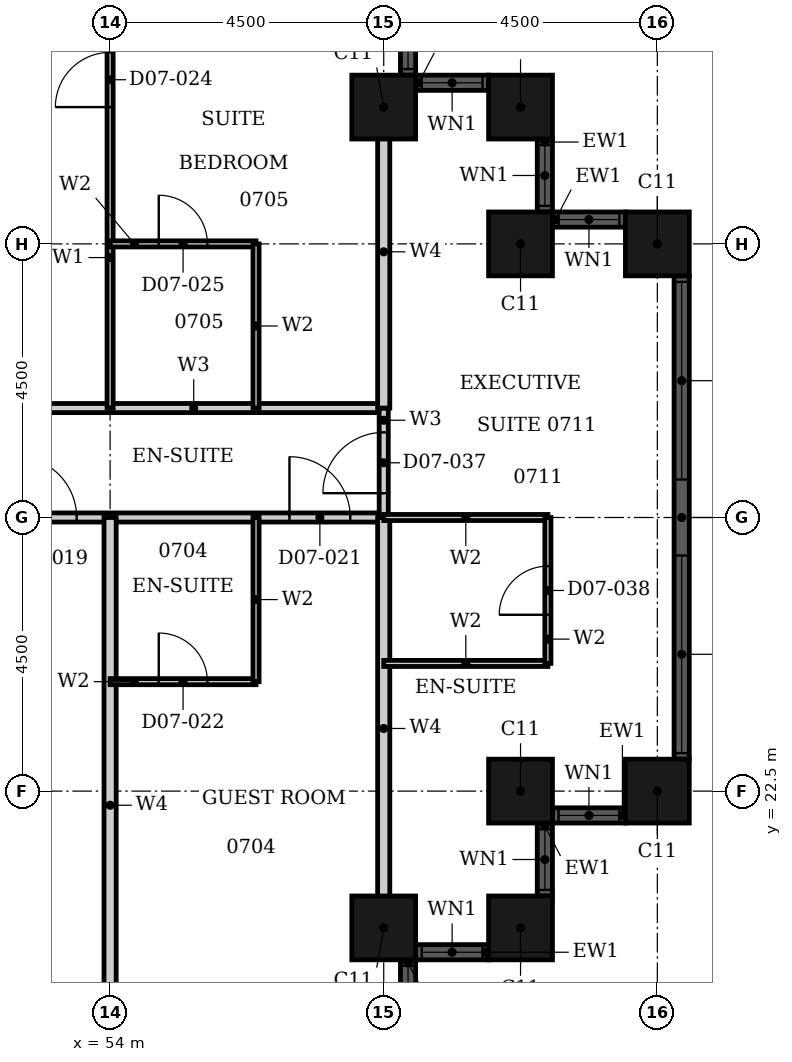
"""IFC4 building model, lengths in metres.
Left out: names, types, materials, properties, quantities, classifications, styles, units other than length and angle.
Written with IfcOpenShell. Run it as: python <this file> out.ifc"""

import sys

from ifc_helpers import new_model, si_unit, direction, frame, frame_2d, origin, origin_2d, place, context, subcontext, project, spatial, rectangle, hollow_rectangle, extrude, element, fill, save


model = new_model("IFC4")
c1 = context("Model", 3, precision=1e-05, world=origin(), true_north=direction((0.0, 1.0)))
c2 = subcontext(c1, "Body", "Model", "MODEL_VIEW")
j1 = project(units=[si_unit("LENGTHUNIT", "METRE"), si_unit("PLANEANGLEUNIT", "RADIAN")], contexts=[c1])
p1 = place(None, origin())
s1 = spatial("IfcSite", under=j1, at=p1, CompositionType="ELEMENT")
p2 = place(p1, origin())
s2 = spatial("IfcBuilding", under=s1, at=p2, CompositionType="ELEMENT")
p3 = place(p2, frame((0.0, 0.0, 37.2)))
s3 = spatial("IfcBuildingStorey", under=s2, at=p3, CompositionType="ELEMENT", Elevation=37.2)
for number, where, z_axis, x_axis in (
    (1, (58.5, 20.25, 0.0), (0.0, 0.0, 1.0), (1.0, 0.0, 0.0)),
    (2, (60.75, 20.25, 0.0), (0.0, 0.0, 1.0), (1.0, 0.0, 0.0)),
    (3, (60.75, 22.5, 0.0), (0.0, 0.0, 1.0), (1.0, 0.0, 0.0)),
    (4, (63.0, 22.5, 0.0), (0.0, 0.0, 1.0), (1.0, 0.0, 0.0)),
    (5, (63.0, 31.5, 0.0), (0.0, 0.0, 1.0), (1.0, 0.0, 0.0)),
    (6, (60.75, 31.5, 0.0), (0.0, 0.0, 1.0), (1.0, 0.0, 0.0)),
    (7, (60.75, 33.75, 0.0), (0.0, 0.0, 1.0), (1.0, 0.0, 0.0)),
    (8, (58.5, 33.75, 0.0), (0.0, 0.0, 1.0), (1.0, 0.0, 0.0)),
):
    element("IfcColumn", number, at=place(p3, frame(where, z_axis=z_axis, x_axis=x_axis)), inside=s3, PredefinedType="COLUMN", context=c2, shape_type="SweptSolid", body=[
        extrude(hollow_rectangle(XDim=1.05, YDim=1.05, WallThickness=0.034, at=origin_2d()), origin(), (0.0, 0.0, 1.0), 3.6),
    ])
p4 = place(p3, frame((58.9, 18.525, 0.0), z_axis=(0.0, 0.0, 1.0), x_axis=(0.0, 1.0, 0.0)))
e9 = element("IfcWall", 9, at=p4, inside=s3, PredefinedType="SOLIDWALL", context=c2, shape_type="SweptSolid", body=[
    extrude(rectangle(XDim=1.2, YDim=0.25, at=frame_2d((0.6, 0.0))), origin(), (0.0, 0.0, 1.0), 3.6),
])
p5 = place(p4, frame((0.1, 0.0, 0.9)))
e10 = element("IfcOpeningElement", 10, at=p5, cuts=e9, PredefinedType="OPENING", context=c2, shape_type="SweptSolid", body=[
    extrude(rectangle(XDim=1.0, YDim=2.08, at=frame_2d((0.5, 1.04))), frame((0.0, 0.135, 0.0), z_axis=(0.0, -1.0, 0.0), x_axis=(1.0, 0.0, 0.0)), (0.0, 0.0, 1.0), 0.27),
])
p6 = place(p3, frame((59.025, 19.85, 0.0), z_axis=(0.0, 0.0, 1.0), x_axis=(1.0, 0.0, 0.0)))
e11 = element("IfcWall", 11, at=p6, inside=s3, PredefinedType="SOLIDWALL", context=c2, shape_type="SweptSolid", body=[
    extrude(rectangle(XDim=1.2, YDim=0.25, at=frame_2d((0.6, 0.0))), origin(), (0.0, 0.0, 1.0), 3.6),
])
p7 = place(p6, frame((0.1, 0.0, 0.9)))
e12 = element("IfcOpeningElement", 12, at=p7, cuts=e11, PredefinedType="OPENING", context=c2, shape_type="SweptSolid", body=[
    extrude(rectangle(XDim=1.0, YDim=2.08, at=frame_2d((0.5, 1.04))), frame((0.0, 0.135, 0.0), z_axis=(0.0, -1.0, 0.0), x_axis=(1.0, 0.0, 0.0)), (0.0, 0.0, 1.0), 0.27),
])
p8 = place(p3, frame((61.15, 20.775, 0.0), z_axis=(0.0, 0.0, 1.0), x_axis=(0.0, 1.0, 0.0)))
e13 = element("IfcWall", 13, at=p8, inside=s3, PredefinedType="SOLIDWALL", context=c2, shape_type="SweptSolid", body=[
    extrude(rectangle(XDim=1.2, YDim=0.25, at=frame_2d((0.6, 0.0))), origin(), (0.0, 0.0, 1.0), 3.6),
])
p9 = place(p8, frame((0.1, 0.0, 0.9)))
e14 = element("IfcOpeningElement", 14, at=p9, cuts=e13, PredefinedType="OPENING", context=c2, shape_type="SweptSolid", body=[
    extrude(rectangle(XDim=1.0, YDim=2.08, at=frame_2d((0.5, 1.04))), frame((0.0, 0.135, 0.0), z_axis=(0.0, -1.0, 0.0), x_axis=(1.0, 0.0, 0.0)), (0.0, 0.0, 1.0), 0.27),
])
p10 = place(p3, frame((61.275, 22.1, 0.0), z_axis=(0.0, 0.0, 1.0), x_axis=(1.0, 0.0, 0.0)))
e15 = element("IfcWall", 15, at=p10, inside=s3, PredefinedType="SOLIDWALL", context=c2, shape_type="SweptSolid", body=[
    extrude(rectangle(XDim=1.2, YDim=0.25, at=frame_2d((0.6, 0.0))), origin(), (0.0, 0.0, 1.0), 3.6),
])
p11 = place(p10, frame((0.1, 0.0, 0.9)))
e16 = element("IfcOpeningElement", 16, at=p11, cuts=e15, PredefinedType="OPENING", context=c2, shape_type="SweptSolid", body=[
    extrude(rectangle(XDim=1.0, YDim=2.08, at=frame_2d((0.5, 1.04))), frame((0.0, 0.135, 0.0), z_axis=(0.0, -1.0, 0.0), x_axis=(1.0, 0.0, 0.0)), (0.0, 0.0, 1.0), 0.27),
])
p12 = place(p3, frame((63.4, 23.025, 0.0), z_axis=(0.0, 0.0, 1.0), x_axis=(0.0, 1.0, 0.0)))
e17 = element("IfcWall", 17, at=p12, inside=s3, PredefinedType="SOLIDWALL", context=c2, shape_type="SweptSolid", body=[
    extrude(rectangle(XDim=7.95, YDim=0.25, at=frame_2d((3.975, 0.0))), origin(), (0.0, 0.0, 1.0), 3.6),
])
p13 = place(p12, frame((0.1, 0.0, 0.9)))
e18 = element("IfcOpeningElement", 18, at=p13, cuts=e17, PredefinedType="OPENING", context=c2, shape_type="SweptSolid", body=[
    extrude(rectangle(XDim=3.25, YDim=2.08, at=frame_2d((1.625, 1.04))), frame((0.0, 0.135, 0.0), z_axis=(0.0, -1.0, 0.0), x_axis=(1.0, 0.0, 0.0)), (0.0, 0.0, 1.0), 0.27),
])
p14 = place(p12, frame((4.6, 0.0, 0.9)))
e19 = element("IfcOpeningElement", 19, at=p14, cuts=e17, PredefinedType="OPENING", context=c2, shape_type="SweptSolid", body=[
    extrude(rectangle(XDim=3.25, YDim=2.08, at=frame_2d((1.625, 1.04))), frame((0.0, 0.135, 0.0), z_axis=(0.0, -1.0, 0.0), x_axis=(1.0, 0.0, 0.0)), (0.0, 0.0, 1.0), 0.27),
])
p15 = place(p3, frame((62.475, 31.9, 0.0), z_axis=(0.0, 0.0, 1.0), x_axis=(-1.0, 0.0, 0.0)))
e20 = element("IfcWall", 20, at=p15, inside=s3, PredefinedType="SOLIDWALL", context=c2, shape_type="SweptSolid", body=[
    extrude(rectangle(XDim=1.2, YDim=0.25, at=frame_2d((0.6, 0.0))), origin(), (0.0, 0.0, 1.0), 3.6),
])
p16 = place(p15, frame((0.1, 0.0, 0.9)))
e21 = element("IfcOpeningElement", 21, at=p16, cuts=e20, PredefinedType="OPENING", context=c2, shape_type="SweptSolid", body=[
    extrude(rectangle(XDim=1.0, YDim=2.08, at=frame_2d((0.5, 1.04))), frame((0.0, 0.135, 0.0), z_axis=(0.0, -1.0, 0.0), x_axis=(1.0, 0.0, 0.0)), (0.0, 0.0, 1.0), 0.27),
])
p17 = place(p3, frame((61.15, 32.025, 0.0), z_axis=(0.0, 0.0, 1.0), x_axis=(0.0, 1.0, 0.0)))
e22 = element("IfcWall", 22, at=p17, inside=s3, PredefinedType="SOLIDWALL", context=c2, shape_type="SweptSolid", body=[
    extrude(rectangle(XDim=1.2, YDim=0.25, at=frame_2d((0.6, 0.0))), origin(), (0.0, 0.0, 1.0), 3.6),
])
p18 = place(p17, frame((0.1, 0.0, 0.9)))
e23 = element("IfcOpeningElement", 23, at=p18, cuts=e22, PredefinedType="OPENING", context=c2, shape_type="SweptSolid", body=[
    extrude(rectangle(XDim=1.0, YDim=2.08, at=frame_2d((0.5, 1.04))), frame((0.0, 0.135, 0.0), z_axis=(0.0, -1.0, 0.0), x_axis=(1.0, 0.0, 0.0)), (0.0, 0.0, 1.0), 0.27),
])
p19 = place(p3, frame((60.225, 34.15, 0.0), z_axis=(0.0, 0.0, 1.0), x_axis=(-1.0, 0.0, 0.0)))
e24 = element("IfcWall", 24, at=p19, inside=s3, PredefinedType="SOLIDWALL", context=c2, shape_type="SweptSolid", body=[
    extrude(rectangle(XDim=1.2, YDim=0.25, at=frame_2d((0.6, 0.0))), origin(), (0.0, 0.0, 1.0), 3.6),
])
p20 = place(p19, frame((0.1, 0.0, 0.9)))
e25 = element("IfcOpeningElement", 25, at=p20, cuts=e24, PredefinedType="OPENING", context=c2, shape_type="SweptSolid", body=[
    extrude(rectangle(XDim=1.0, YDim=2.08, at=frame_2d((0.5, 1.04))), frame((0.0, 0.135, 0.0), z_axis=(0.0, -1.0, 0.0), x_axis=(1.0, 0.0, 0.0)), (0.0, 0.0, 1.0), 0.27),
])
p21 = place(p3, frame((58.9, 34.275, 0.0), z_axis=(0.0, 0.0, 1.0), x_axis=(0.0, 1.0, 0.0)))
e26 = element("IfcWall", 26, at=p21, inside=s3, PredefinedType="SOLIDWALL", context=c2, shape_type="SweptSolid", body=[
    extrude(rectangle(XDim=1.2, YDim=0.25, at=frame_2d((0.6, 0.0))), origin(), (0.0, 0.0, 1.0), 3.6),
])
p22 = place(p21, frame((0.1, 0.0, 0.9)))
e27 = element("IfcOpeningElement", 27, at=p22, cuts=e26, PredefinedType="OPENING", context=c2, shape_type="SweptSolid", body=[
    extrude(rectangle(XDim=1.0, YDim=2.08, at=frame_2d((0.5, 1.04))), frame((0.0, 0.135, 0.0), z_axis=(0.0, -1.0, 0.0), x_axis=(1.0, 0.0, 0.0)), (0.0, 0.0, 1.0), 0.27),
])
p23 = place(p3, frame((46.8, 27.0, 0.0), z_axis=(0.0, 0.0, 1.0), x_axis=(1.0, 0.0, 0.0)))
e28 = element("IfcWall", 28, at=p23, inside=s3, PredefinedType="PARTITIONING", context=c2, shape_type="SweptSolid", body=[
    extrude(rectangle(XDim=11.7, YDim=0.15, at=frame_2d((5.85, 0.0))), origin(), (0.0, 0.0, 1.0), 2.58),
])
p24 = place(p23, frame((5.65, 0.0, 0.0)))
e29 = element("IfcOpeningElement", 29, at=p24, cuts=e28, PredefinedType="OPENING", context=c2, shape_type="SweptSolid", body=[
    extrude(rectangle(XDim=1.0, YDim=2.1, at=frame_2d((0.5, 1.05))), frame((0.0, 0.085, 0.0), z_axis=(0.0, -1.0, 0.0), x_axis=(1.0, 0.0, 0.0)), (0.0, 0.0, 1.0), 0.17),
])
p25 = place(p23, frame((10.15, 0.0, 0.0)))
e30 = element("IfcOpeningElement", 30, at=p25, cuts=e28, PredefinedType="OPENING", context=c2, shape_type="SweptSolid", body=[
    extrude(rectangle(XDim=1.0, YDim=2.1, at=frame_2d((0.5, 1.05))), frame((0.0, 0.085, 0.0), z_axis=(0.0, -1.0, 0.0), x_axis=(1.0, 0.0, 0.0)), (0.0, 0.0, 1.0), 0.17),
])
p26 = place(p3, frame((46.8, 28.8, 0.0), z_axis=(0.0, 0.0, 1.0), x_axis=(1.0, 0.0, 0.0)))
e31 = element("IfcWall", 31, at=p26, inside=s3, PredefinedType="PARTITIONING", context=c2, shape_type="SweptSolid", body=[
    extrude(rectangle(XDim=11.7, YDim=0.15, at=frame_2d((5.85, 0.0))), origin(), (0.0, 0.0, 1.0), 3.3),
])
p27 = place(p26, frame((4.45, 0.0, 0.0)))
e32 = element("IfcOpeningElement", 32, at=p27, cuts=e31, PredefinedType="OPENING", context=c2, shape_type="SweptSolid", body=[
    extrude(rectangle(XDim=1.0, YDim=2.1, at=frame_2d((0.5, 1.05))), frame((0.0, 0.085, 0.0), z_axis=(0.0, -1.0, 0.0), x_axis=(1.0, 0.0, 0.0)), (0.0, 0.0, 1.0), 0.17),
])
p28 = place(p3, frame((58.5, 27.0, 0.0), z_axis=(0.0, 0.0, 1.0), x_axis=(0.0, 1.0, 0.0)))
e33 = element("IfcWall", 33, at=p28, inside=s3, PredefinedType="PARTITIONING", context=c2, shape_type="SweptSolid", body=[
    extrude(rectangle(XDim=1.8, YDim=0.15, at=frame_2d((0.9, 0.0))), origin(), (0.0, 0.0, 1.0), 3.3),
])
p29 = place(p28, frame((0.4, 0.0, 0.0)))
e34 = element("IfcOpeningElement", 34, at=p29, cuts=e33, PredefinedType="OPENING", context=c2, shape_type="SweptSolid", body=[
    extrude(rectangle(XDim=1.0, YDim=2.1, at=frame_2d((0.5, 1.05))), frame((0.0, 0.085, 0.0), z_axis=(0.0, -1.0, 0.0), x_axis=(1.0, 0.0, 0.0)), (0.0, 0.0, 1.0), 0.17),
])
p30 = place(p3, frame((54.0, 28.8, 0.0), z_axis=(0.0, 0.0, 1.0), x_axis=(0.0, 1.0, 0.0)))
e35 = element("IfcWall", 35, at=p30, inside=s3, PredefinedType="PARTITIONING", context=c2, shape_type="SweptSolid", body=[
    extrude(rectangle(XDim=7.665, YDim=0.1, at=frame_2d((3.833, 0.0))), origin(), (0.0, 0.0, 1.0), 3.3),
])
p31 = place(p30, frame((4.95, 0.0, 0.0)))
e36 = element("IfcOpeningElement", 36, at=p31, cuts=e35, PredefinedType="OPENING", context=c2, shape_type="SweptSolid", body=[
    extrude(rectangle(XDim=0.9, YDim=2.1, at=frame_2d((0.45, 1.05))), frame((0.0, 0.06, 0.0), z_axis=(0.0, -1.0, 0.0), x_axis=(1.0, 0.0, 0.0)), (0.0, 0.0, 1.0), 0.12),
])
p32 = place(p3, frame((54.0, 17.535, 0.0), z_axis=(0.0, 0.0, 1.0), x_axis=(0.0, 1.0, 0.0)))
e37 = element("IfcWall", 37, at=p32, inside=s3, PredefinedType="PARTITIONING", context=c2, shape_type="SweptSolid", body=[
    extrude(rectangle(XDim=9.465, YDim=0.2, at=frame_2d((4.732, 0.0))), origin(), (0.0, 0.0, 1.0), 3.3),
])
p33 = place(p3, frame((58.5, 20.06, 0.0), z_axis=(0.0, 0.0, 1.0), x_axis=(0.0, 1.0, 0.0)))
e38 = element("IfcWall", 38, at=p33, inside=s3, PredefinedType="PARTITIONING", context=c2, shape_type="SweptSolid", body=[
    extrude(rectangle(XDim=6.94, YDim=0.2, at=frame_2d((3.47, 0.0))), origin(), (0.0, 0.0, 1.0), 3.3),
])
p34 = place(p3, frame((58.5, 28.8, 0.0), z_axis=(0.0, 0.0, 1.0), x_axis=(0.0, 1.0, 0.0)))
e39 = element("IfcWall", 39, at=p34, inside=s3, PredefinedType="PARTITIONING", context=c2, shape_type="SweptSolid", body=[
    extrude(rectangle(XDim=5.14, YDim=0.2, at=frame_2d((2.57, 0.0))), origin(), (0.0, 0.0, 1.0), 3.3),
])
p35 = place(p3, frame((54.0, 24.3, 0.0), z_axis=(0.0, 0.0, 1.0), x_axis=(1.0, 0.0, 0.0)))
e40 = element("IfcWall", 40, at=p35, inside=s3, PredefinedType="PARTITIONING", context=c2, shape_type="SweptSolid", body=[
    extrude(rectangle(XDim=2.4, YDim=0.1, at=frame_2d((1.2, 0.0))), origin(), (0.0, 0.0, 1.0), 3.3),
])
p36 = place(p35, frame((0.8, 0.0, 0.0)))
e41 = element("IfcOpeningElement", 41, at=p36, cuts=e40, PredefinedType="OPENING", context=c2, shape_type="SweptSolid", body=[
    extrude(rectangle(XDim=0.8, YDim=2.1, at=frame_2d((0.4, 1.05))), frame((0.0, 0.06, 0.0), z_axis=(0.0, -1.0, 0.0), x_axis=(1.0, 0.0, 0.0)), (0.0, 0.0, 1.0), 0.12),
])
p37 = place(p3, frame((58.5, 24.6, 0.0), z_axis=(0.0, 0.0, 1.0), x_axis=(1.0, 0.0, 0.0)))
e42 = element("IfcWall", 42, at=p37, inside=s3, PredefinedType="PARTITIONING", context=c2, shape_type="SweptSolid", body=[
    extrude(rectangle(XDim=2.7, YDim=0.1, at=frame_2d((1.35, 0.0))), origin(), (0.0, 0.0, 1.0), 3.3),
])
p38 = place(p3, frame((58.5, 27.0, 0.0), z_axis=(0.0, 0.0, 1.0), x_axis=(1.0, 0.0, 0.0)))
e43 = element("IfcWall", 43, at=p38, inside=s3, PredefinedType="PARTITIONING", context=c2, shape_type="SweptSolid", body=[
    extrude(rectangle(XDim=2.7, YDim=0.1, at=frame_2d((1.35, 0.0))), origin(), (0.0, 0.0, 1.0), 2.58),
])
p39 = place(p3, frame((54.0, 31.5, 0.0), z_axis=(0.0, 0.0, 1.0), x_axis=(1.0, 0.0, 0.0)))
e44 = element("IfcWall", 44, at=p39, inside=s3, PredefinedType="PARTITIONING", context=c2, shape_type="SweptSolid", body=[
    extrude(rectangle(XDim=2.4, YDim=0.1, at=frame_2d((1.2, 0.0))), origin(), (0.0, 0.0, 1.0), 2.58),
])
p40 = place(p39, frame((0.8, 0.0, 0.0)))
e45 = element("IfcOpeningElement", 45, at=p40, cuts=e44, PredefinedType="OPENING", context=c2, shape_type="SweptSolid", body=[
    extrude(rectangle(XDim=0.8, YDim=2.1, at=frame_2d((0.4, 1.05))), frame((0.0, 0.06, 0.0), z_axis=(0.0, -1.0, 0.0), x_axis=(1.0, 0.0, 0.0)), (0.0, 0.0, 1.0), 0.12),
])
for number, where, z_axis, x_axis in (
    (46, (56.4, 24.3, 0.0), (0.0, 0.0, 1.0), (0.0, 1.0, 0.0)),
    (47, (56.4, 28.8, 0.0), (0.0, 0.0, 1.0), (0.0, 1.0, 0.0)),
):
    element("IfcWall", number, at=place(p3, frame(where, z_axis=z_axis, x_axis=x_axis)), inside=s3, PredefinedType="PARTITIONING", context=c2, shape_type="SweptSolid", body=[
        extrude(rectangle(XDim=2.7, YDim=0.1, at=frame_2d((1.35, 0.0))), origin(), (0.0, 0.0, 1.0), 3.3),
    ])
p41 = place(p3, frame((61.2, 24.6, 0.0), z_axis=(0.0, 0.0, 1.0), x_axis=(0.0, 1.0, 0.0)))
e48 = element("IfcWall", 48, at=p41, inside=s3, PredefinedType="PARTITIONING", context=c2, shape_type="SweptSolid", body=[
    extrude(rectangle(XDim=2.4, YDim=0.1, at=frame_2d((1.2, 0.0))), origin(), (0.0, 0.0, 1.0), 3.3),
])
p42 = place(p41, frame((0.8, 0.0, 0.0)))
e49 = element("IfcOpeningElement", 49, at=p42, cuts=e48, PredefinedType="OPENING", context=c2, shape_type="SweptSolid", body=[
    extrude(rectangle(XDim=0.8, YDim=2.1, at=frame_2d((0.4, 1.05))), frame((0.0, 0.06, 0.0), z_axis=(0.0, -1.0, 0.0), x_axis=(1.0, 0.0, 0.0)), (0.0, 0.0, 1.0), 0.12),
])
p43 = place(p5, origin())
e50 = element("IfcWindow", 50, at=p43, inside=s3, PartitioningType="SINGLE_PANEL", PredefinedType="WINDOW", context=c2, shape_type="SweptSolid", body=[
    extrude(rectangle(XDim=1.0, YDim=2.08, at=frame_2d((0.5, 1.04))), frame((0.0, 0.03, 0.0), z_axis=(0.0, -1.0, 0.0), x_axis=(1.0, 0.0, 0.0)), (0.0, 0.0, 1.0), 0.06),
])
fill(e10, e50)
p44 = place(p7, origin())
e51 = element("IfcWindow", 51, at=p44, inside=s3, PartitioningType="SINGLE_PANEL", PredefinedType="WINDOW", context=c2, shape_type="SweptSolid", body=[
    extrude(rectangle(XDim=1.0, YDim=2.08, at=frame_2d((0.5, 1.04))), frame((0.0, 0.03, 0.0), z_axis=(0.0, -1.0, 0.0), x_axis=(1.0, 0.0, 0.0)), (0.0, 0.0, 1.0), 0.06),
])
fill(e12, e51)
p45 = place(p9, origin())
e52 = element("IfcWindow", 52, at=p45, inside=s3, PartitioningType="SINGLE_PANEL", PredefinedType="WINDOW", context=c2, shape_type="SweptSolid", body=[
    extrude(rectangle(XDim=1.0, YDim=2.08, at=frame_2d((0.5, 1.04))), frame((0.0, 0.03, 0.0), z_axis=(0.0, -1.0, 0.0), x_axis=(1.0, 0.0, 0.0)), (0.0, 0.0, 1.0), 0.06),
])
fill(e14, e52)
p46 = place(p11, origin())
e53 = element("IfcWindow", 53, at=p46, inside=s3, PartitioningType="SINGLE_PANEL", PredefinedType="WINDOW", context=c2, shape_type="SweptSolid", body=[
    extrude(rectangle(XDim=1.0, YDim=2.08, at=frame_2d((0.5, 1.04))), frame((0.0, 0.03, 0.0), z_axis=(0.0, -1.0, 0.0), x_axis=(1.0, 0.0, 0.0)), (0.0, 0.0, 1.0), 0.06),
])
fill(e16, e53)
p47 = place(p13, origin())
e54 = element("IfcWindow", 54, at=p47, inside=s3, PartitioningType="SINGLE_PANEL", PredefinedType="WINDOW", context=c2, shape_type="SweptSolid", body=[
    extrude(rectangle(XDim=3.25, YDim=2.08, at=frame_2d((1.625, 1.04))), frame((0.0, 0.03, 0.0), z_axis=(0.0, -1.0, 0.0), x_axis=(1.0, 0.0, 0.0)), (0.0, 0.0, 1.0), 0.06),
])
fill(e18, e54)
p48 = place(p14, origin())
e55 = element("IfcWindow", 55, at=p48, inside=s3, PartitioningType="SINGLE_PANEL", PredefinedType="WINDOW", context=c2, shape_type="SweptSolid", body=[
    extrude(rectangle(XDim=3.25, YDim=2.08, at=frame_2d((1.625, 1.04))), frame((0.0, 0.03, 0.0), z_axis=(0.0, -1.0, 0.0), x_axis=(1.0, 0.0, 0.0)), (0.0, 0.0, 1.0), 0.06),
])
fill(e19, e55)
p49 = place(p16, origin())
e56 = element("IfcWindow", 56, at=p49, inside=s3, PartitioningType="SINGLE_PANEL", PredefinedType="WINDOW", context=c2, shape_type="SweptSolid", body=[
    extrude(rectangle(XDim=1.0, YDim=2.08, at=frame_2d((0.5, 1.04))), frame((0.0, 0.03, 0.0), z_axis=(0.0, -1.0, 0.0), x_axis=(1.0, 0.0, 0.0)), (0.0, 0.0, 1.0), 0.06),
])
fill(e21, e56)
p50 = place(p18, origin())
e57 = element("IfcWindow", 57, at=p50, inside=s3, PartitioningType="SINGLE_PANEL", PredefinedType="WINDOW", context=c2, shape_type="SweptSolid", body=[
    extrude(rectangle(XDim=1.0, YDim=2.08, at=frame_2d((0.5, 1.04))), frame((0.0, 0.03, 0.0), z_axis=(0.0, -1.0, 0.0), x_axis=(1.0, 0.0, 0.0)), (0.0, 0.0, 1.0), 0.06),
])
fill(e23, e57)
p51 = place(p20, origin())
e58 = element("IfcWindow", 58, at=p51, inside=s3, PartitioningType="SINGLE_PANEL", PredefinedType="WINDOW", context=c2, shape_type="SweptSolid", body=[
    extrude(rectangle(XDim=1.0, YDim=2.08, at=frame_2d((0.5, 1.04))), frame((0.0, 0.03, 0.0), z_axis=(0.0, -1.0, 0.0), x_axis=(1.0, 0.0, 0.0)), (0.0, 0.0, 1.0), 0.06),
])
fill(e25, e58)
p52 = place(p22, origin())
e59 = element("IfcWindow", 59, at=p52, inside=s3, PartitioningType="SINGLE_PANEL", PredefinedType="WINDOW", context=c2, shape_type="SweptSolid", body=[
    extrude(rectangle(XDim=1.0, YDim=2.08, at=frame_2d((0.5, 1.04))), frame((0.0, 0.03, 0.0), z_axis=(0.0, -1.0, 0.0), x_axis=(1.0, 0.0, 0.0)), (0.0, 0.0, 1.0), 0.06),
])
fill(e27, e59)
p53 = place(p24, origin())
e60 = element("IfcDoor", 60, at=p53, inside=s3, OperationType="SINGLE_SWING_RIGHT", PredefinedType="DOOR", context=c2, shape_type="SweptSolid", body=[
    extrude(rectangle(XDim=1.0, YDim=2.1, at=frame_2d((0.5, 1.05))), frame((0.0, 0.025, 0.0), z_axis=(0.0, -1.0, 0.0), x_axis=(1.0, 0.0, 0.0)), (0.0, 0.0, 1.0), 0.05),
])
fill(e29, e60)
p54 = place(p25, origin())
e61 = element("IfcDoor", 61, at=p54, inside=s3, OperationType="SINGLE_SWING_RIGHT", PredefinedType="DOOR", context=c2, shape_type="SweptSolid", body=[
    extrude(rectangle(XDim=1.0, YDim=2.1, at=frame_2d((0.5, 1.05))), frame((0.0, 0.025, 0.0), z_axis=(0.0, -1.0, 0.0), x_axis=(1.0, 0.0, 0.0)), (0.0, 0.0, 1.0), 0.05),
])
fill(e30, e61)
p55 = place(p36, origin())
e62 = element("IfcDoor", 62, at=p55, inside=s3, OperationType="SINGLE_SWING_RIGHT", PredefinedType="DOOR", context=c2, shape_type="SweptSolid", body=[
    extrude(rectangle(XDim=0.8, YDim=2.1, at=frame_2d((0.4, 1.05))), frame((0.0, 0.025, 0.0), z_axis=(0.0, -1.0, 0.0), x_axis=(1.0, 0.0, 0.0)), (0.0, 0.0, 1.0), 0.05),
])
fill(e41, e62)
p56 = place(p31, origin())
e63 = element("IfcDoor", 63, at=p56, inside=s3, OperationType="SINGLE_SWING_RIGHT", PredefinedType="DOOR", context=c2, shape_type="SweptSolid", body=[
    extrude(rectangle(XDim=0.9, YDim=2.1, at=frame_2d((0.45, 1.05))), frame((0.0, 0.025, 0.0), z_axis=(0.0, -1.0, 0.0), x_axis=(1.0, 0.0, 0.0)), (0.0, 0.0, 1.0), 0.05),
])
fill(e36, e63)
p57 = place(p40, origin())
e64 = element("IfcDoor", 64, at=p57, inside=s3, OperationType="SINGLE_SWING_RIGHT", PredefinedType="DOOR", context=c2, shape_type="SweptSolid", body=[
    extrude(rectangle(XDim=0.8, YDim=2.1, at=frame_2d((0.4, 1.05))), frame((0.0, 0.025, 0.0), z_axis=(0.0, -1.0, 0.0), x_axis=(1.0, 0.0, 0.0)), (0.0, 0.0, 1.0), 0.05),
])
fill(e45, e64)
p58 = place(p29, origin())
e65 = element("IfcDoor", 65, at=p58, inside=s3, OperationType="SINGLE_SWING_LEFT", PredefinedType="DOOR", context=c2, shape_type="SweptSolid", body=[
    extrude(rectangle(XDim=1.0, YDim=2.1, at=frame_2d((0.5, 1.05))), frame((0.0, 0.025, 0.0), z_axis=(0.0, -1.0, 0.0), x_axis=(1.0, 0.0, 0.0)), (0.0, 0.0, 1.0), 0.05),
])
fill(e34, e65)
p59 = place(p42, origin())
e66 = element("IfcDoor", 66, at=p59, inside=s3, OperationType="SINGLE_SWING_RIGHT", PredefinedType="DOOR", context=c2, shape_type="SweptSolid", body=[
    extrude(rectangle(XDim=0.8, YDim=2.1, at=frame_2d((0.4, 1.05))), frame((0.0, 0.025, 0.0), z_axis=(0.0, -1.0, 0.0), x_axis=(1.0, 0.0, 0.0)), (0.0, 0.0, 1.0), 0.05),
])
fill(e49, e66)
save(model, sys.argv[1])
